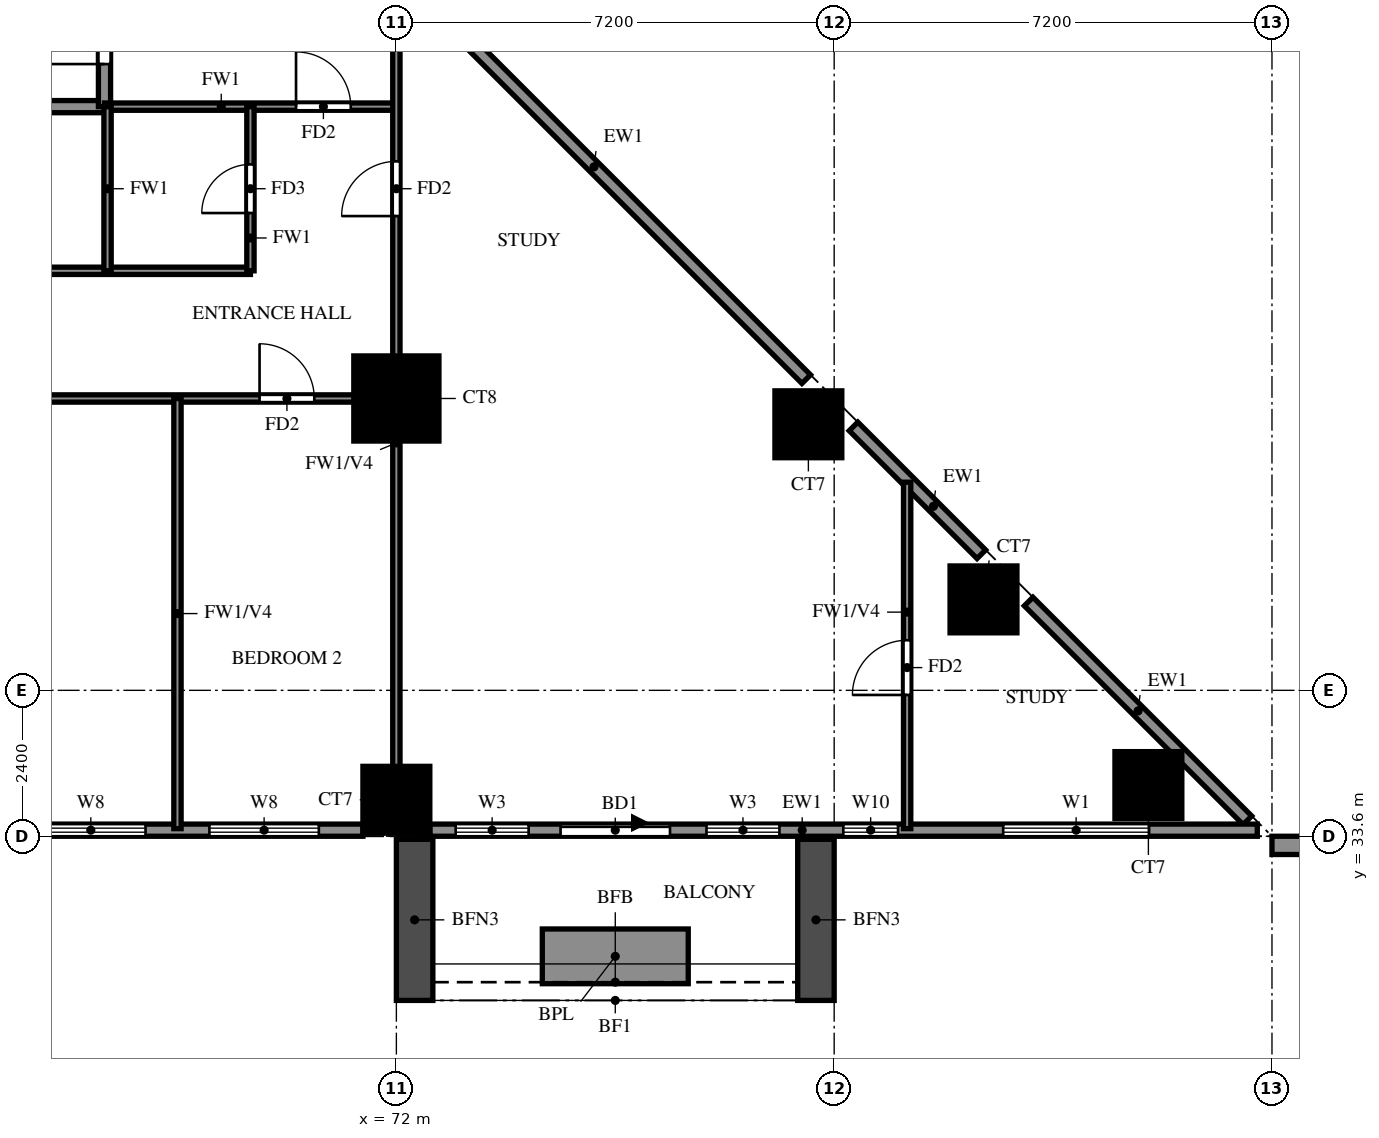
"""IFC4 building model, lengths in metres.
Left out: names, types, materials, properties, quantities, classifications, styles, units other than length and angle.
Written with IfcOpenShell. Run it as: python <this file> out.ifc"""

import sys

from ifc_helpers import new_model, si_unit, direction, frame, frame_2d, origin, origin_2d, place, context, subcontext, project, spatial, rectangle, extrude, source, transform, mapped, element, fill, save


model = new_model("IFC4")
c1 = context("Model", 3, precision=1e-05, world=origin(), true_north=direction((0.0, 1.0)))
c2 = subcontext(c1, "Body", "Model", "MODEL_VIEW")
j1 = project(units=[si_unit("LENGTHUNIT", "METRE"), si_unit("PLANEANGLEUNIT", "RADIAN")], contexts=[c1])
p1 = place(None, origin())
s1 = spatial("IfcSite", under=j1, at=p1, CompositionType="ELEMENT")
p2 = place(p1, origin())
s2 = spatial("IfcBuilding", under=s1, at=p2, CompositionType="ELEMENT")
p3 = place(p2, frame((0.0, 0.0, 34.0)))
s3 = spatial("IfcBuildingStorey", under=s2, at=p3, CompositionType="ELEMENT", Elevation=34.0)
m1 = source(origin(), c2, "Body", "SweptSolid", [
    extrude(rectangle(XDim=1.1, YDim=1.1, at=origin_2d()), origin(), (0.0, 0.0, 1.0), 3.18),
])
for number, where, z_axis, x_axis in (
    (1, (72.0, 34.2, 0.0), (0.0, 0.0, 1.0), (1.0, 0.0, 0.0)),
    (2, (84.367, 34.442, 0.0), (0.0, 0.0, 1.0), (1.0, 0.0, 0.0)),
    (3, (81.656, 37.496, 0.0), (0.0, 0.0, 1.0), (1.0, 0.0, 0.0)),
    (4, (78.776, 40.376, 0.0), (0.0, 0.0, 1.0), (1.0, 0.0, 0.0)),
):
    element("IfcColumn", number, at=place(p3, frame(where, z_axis=z_axis, x_axis=x_axis)), inside=s3, PredefinedType="COLUMN", context=c2, shape_type="MappedRepresentation", body=[
        mapped(m1, transform((0.0, 0.0, 0.0))),
    ])
m2 = source(origin(), c2, "Body", "SweptSolid", [
    extrude(rectangle(XDim=1.4, YDim=1.4, at=origin_2d()), origin(), (0.0, 0.0, 1.0), 3.18),
])
p4 = place(p3, frame((72.0, 40.8, 0.0), z_axis=(0.0, 0.0, 1.0), x_axis=(1.0, 0.0, 0.0)))
e5 = element("IfcColumn", 5, at=p4, inside=s3, PredefinedType="COLUMN", context=c2, shape_type="MappedRepresentation", body=[
    mapped(m2, transform((0.0, 0.0, 0.0))),
])
p5 = place(p3, frame((85.996, 33.863, 0.0), z_axis=(0.0, 0.0, 1.0), x_axis=(-0.7070827891, 0.707130772459, 0.0)))
e6 = element("IfcWall", 6, at=p5, inside=s3, PredefinedType="SOLIDWALL", context=c2, shape_type="SweptSolid", body=[
    extrude(rectangle(XDim=5.088, YDim=0.2, at=frame_2d((2.544, 0.0))), origin(), (0.0, 0.0, 1.0), 3.18),
])
p6 = place(p3, frame((81.62, 38.238, 0.0), z_axis=(0.0, 0.0, 1.0), x_axis=(-0.707106781187, 0.707106781187, 0.0)))
e7 = element("IfcWall", 7, at=p6, inside=s3, PredefinedType="SOLIDWALL", context=c2, shape_type="SweptSolid", body=[
    extrude(rectangle(XDim=2.973, YDim=0.2, at=frame_2d((1.486, 0.0))), origin(), (0.0, 0.0, 1.0), 3.18),
])
p7 = place(p3, frame((78.74, 41.118, 0.0), z_axis=(0.0, 0.0, 1.0), x_axis=(-0.707106781187, 0.707106781187, 0.0)))
e8 = element("IfcWall", 8, at=p7, inside=s3, PredefinedType="SOLIDWALL", context=c2, shape_type="SweptSolid", body=[
    extrude(rectangle(XDim=9.874, YDim=0.2, at=frame_2d((4.937, 0.0))), origin(), (0.0, 0.0, 1.0), 3.18),
])
p8 = place(p3, frame((65.35, 33.7, 0.0), z_axis=(0.0, 0.0, 1.0), x_axis=(1.0, 0.0, 0.0)))
e9 = element("IfcWall", 9, at=p8, inside=s3, PredefinedType="SOLIDWALL", context=c2, shape_type="SweptSolid", body=[
    extrude(rectangle(XDim=6.1, YDim=0.2, at=frame_2d((3.05, 0.0))), origin(), (0.0, 0.0, 1.0), 3.18),
])
p9 = place(p8, frame((3.575, 0.0, 0.6)))
e10 = element("IfcOpeningElement", 10, at=p9, cuts=e9, PredefinedType="OPENING", context=c2, shape_type="SweptSolid", body=[
    extrude(rectangle(XDim=1.8, YDim=2.4, at=frame_2d((0.9, 1.2))), frame((0.0, 0.11, 0.0), z_axis=(0.0, -1.0, 0.0), x_axis=(1.0, 0.0, 0.0)), (0.0, 0.0, 1.0), 0.22),
])
p10 = place(p8, frame((0.725, 0.0, 0.6)))
e11 = element("IfcOpeningElement", 11, at=p10, cuts=e9, PredefinedType="OPENING", context=c2, shape_type="SweptSolid", body=[
    extrude(rectangle(XDim=1.8, YDim=2.4, at=frame_2d((0.9, 1.2))), frame((0.0, 0.11, 0.0), z_axis=(0.0, -1.0, 0.0), x_axis=(1.0, 0.0, 0.0)), (0.0, 0.0, 1.0), 0.22),
])
p11 = place(p3, frame((72.55, 33.7, 0.0), z_axis=(0.0, 0.0, 1.0), x_axis=(1.0, 0.0, 0.0)))
e12 = element("IfcWall", 12, at=p11, inside=s3, PredefinedType="SOLIDWALL", context=c2, shape_type="SweptSolid", body=[
    extrude(rectangle(XDim=13.609, YDim=0.2, at=frame_2d((6.804, 0.0))), origin(), (0.0, 0.0, 1.0), 3.18),
])
p12 = place(p11, frame((2.15, 0.0, 0.0)))
e13 = element("IfcOpeningElement", 13, at=p12, cuts=e12, PredefinedType="OPENING", context=c2, shape_type="SweptSolid", body=[
    extrude(rectangle(XDim=1.8, YDim=2.4, at=frame_2d((0.9, 1.2))), frame((0.0, 0.11, 0.0), z_axis=(0.0, -1.0, 0.0), x_axis=(1.0, 0.0, 0.0)), (0.0, 0.0, 1.0), 0.22),
])
p13 = place(p11, frame((0.425, 0.0, 0.6)))
e14 = element("IfcOpeningElement", 14, at=p13, cuts=e12, PredefinedType="OPENING", context=c2, shape_type="SweptSolid", body=[
    extrude(rectangle(XDim=1.2, YDim=2.4, at=frame_2d((0.6, 1.2))), frame((0.0, 0.11, 0.0), z_axis=(0.0, -1.0, 0.0), x_axis=(1.0, 0.0, 0.0)), (0.0, 0.0, 1.0), 0.22),
])
p14 = place(p11, frame((4.55, 0.0, 0.6)))
e15 = element("IfcOpeningElement", 15, at=p14, cuts=e12, PredefinedType="OPENING", context=c2, shape_type="SweptSolid", body=[
    extrude(rectangle(XDim=1.2, YDim=2.4, at=frame_2d((0.6, 1.2))), frame((0.0, 0.11, 0.0), z_axis=(0.0, -1.0, 0.0), x_axis=(1.0, 0.0, 0.0)), (0.0, 0.0, 1.0), 0.22),
])
p15 = place(p11, frame((6.8, 0.0, 0.6)))
e16 = element("IfcOpeningElement", 16, at=p15, cuts=e12, PredefinedType="OPENING", context=c2, shape_type="SweptSolid", body=[
    extrude(rectangle(XDim=0.9, YDim=2.4, at=frame_2d((0.45, 1.2))), frame((0.0, 0.11, 0.0), z_axis=(0.0, -1.0, 0.0), x_axis=(1.0, 0.0, 0.0)), (0.0, 0.0, 1.0), 0.22),
])
p16 = place(p11, frame((9.429, 0.0, 0.6)))
e17 = element("IfcOpeningElement", 17, at=p16, cuts=e12, PredefinedType="OPENING", context=c2, shape_type="SweptSolid", body=[
    extrude(rectangle(XDim=2.4, YDim=2.4, at=frame_2d((1.2, 1.2))), frame((0.0, 0.11, 0.0), z_axis=(0.0, -1.0, 0.0), x_axis=(1.0, 0.0, 0.0)), (0.0, 0.0, 1.0), 0.22),
])
p17 = place(p3, frame((86.4, 33.45, -0.32), z_axis=(0.0, 0.0, 1.0), x_axis=(1.0, 0.0, 0.0)))
e18 = element("IfcWall", 18, at=p17, inside=s3, PredefinedType="SOLIDWALL", context=c2, shape_type="SweptSolid", body=[
    extrude(rectangle(XDim=2.4, YDim=0.3, at=frame_2d((1.2, 0.0))), origin(), (0.0, 0.0, 1.0), 3.5),
])
for number, where, z_axis, x_axis in (
    (19, (72.3, 33.55, 0.0), (0.0, 0.0, 1.0), (0.0, -1.0, 0.0)),
    (20, (78.9, 33.55, 0.0), (0.0, 0.0, 1.0), (0.0, -1.0, 0.0)),
):
    element("IfcWall", number, at=place(p3, frame(where, z_axis=z_axis, x_axis=x_axis)), inside=s3, PredefinedType="SOLIDWALL", context=c2, shape_type="SweptSolid", body=[
        extrude(rectangle(XDim=2.65, YDim=0.6, at=frame_2d((1.325, 0.0))), origin(), (0.0, 0.0, 1.0), 2.85),
    ])
p18 = place(p3, frame((74.4, 31.625, 0.0), z_axis=(0.0, 0.0, 1.0), x_axis=(1.0, 0.0, 0.0)))
e21 = element("IfcWall", 21, at=p18, inside=s3, PredefinedType="SOLIDWALL", context=c2, shape_type="SweptSolid", body=[
    extrude(rectangle(XDim=2.4, YDim=0.9, at=frame_2d((1.2, 0.0))), origin(), (0.0, 0.0, 1.0), 0.9),
])
p19 = place(p3, frame((60.0, 45.6, 0.0), z_axis=(0.0, 0.0, 1.0), x_axis=(1.0, 0.0, 0.0)))
e22 = element("IfcWall", 22, at=p19, inside=s3, PredefinedType="SOLIDWALL", context=c2, shape_type="SweptSolid", body=[
    extrude(rectangle(XDim=7.25, YDim=0.2, at=frame_2d((3.625, 0.0))), origin(), (0.0, 0.0, 1.0), 3.18),
])
p20 = place(p3, frame((67.2, 45.6, 0.0), z_axis=(0.0, 0.0, 1.0), x_axis=(0.0, 1.0, 0.0)))
e23 = element("IfcWall", 23, at=p20, inside=s3, PredefinedType="SOLIDWALL", context=c2, shape_type="SweptSolid", body=[
    extrude(rectangle(XDim=8.4, YDim=0.2, at=frame_2d((4.2, 0.0))), origin(), (0.0, 0.0, 1.0), 3.18),
])
p21 = place(p20, frame((0.7, 0.0, 0.0)))
e24 = element("IfcOpeningElement", 24, at=p21, cuts=e23, PredefinedType="OPENING", context=c2, shape_type="SweptSolid", body=[
    extrude(rectangle(XDim=1.0, YDim=2.1, at=frame_2d((0.5, 1.05))), frame((0.0, 0.11, 0.0), z_axis=(0.0, -1.0, 0.0), x_axis=(1.0, 0.0, 0.0)), (0.0, 0.0, 1.0), 0.22),
])
p22 = place(p3, frame((60.0, 40.8, 0.0), z_axis=(0.0, 0.0, 1.0), x_axis=(1.0, 0.0, 0.0)))
e25 = element("IfcWall", 25, at=p22, inside=s3, PredefinedType="PARTITIONING", context=c2, shape_type="SweptSolid", body=[
    extrude(rectangle(XDim=12.0, YDim=0.12, at=frame_2d((6.0, 0.0))), origin(), (0.0, 0.0, 1.0), 3.18),
])
p23 = place(p22, frame((9.75, 0.0, 0.0)))
e26 = element("IfcOpeningElement", 26, at=p23, cuts=e25, PredefinedType="OPENING", context=c2, shape_type="SweptSolid", body=[
    extrude(rectangle(XDim=0.9, YDim=2.1, at=frame_2d((0.45, 1.05))), frame((0.0, 0.07, 0.0), z_axis=(0.0, -1.0, 0.0), x_axis=(1.0, 0.0, 0.0)), (0.0, 0.0, 1.0), 0.14),
])
p24 = place(p22, frame((2.55, 0.0, 0.0)))
e27 = element("IfcOpeningElement", 27, at=p24, cuts=e25, PredefinedType="OPENING", context=c2, shape_type="SweptSolid", body=[
    extrude(rectangle(XDim=1.5, YDim=2.1, at=frame_2d((0.75, 1.05))), frame((0.0, 0.07, 0.0), z_axis=(0.0, -1.0, 0.0), x_axis=(1.0, 0.0, 0.0)), (0.0, 0.0, 1.0), 0.14),
])
p25 = place(p3, frame((60.0, 42.9, 0.0), z_axis=(0.0, 0.0, 1.0), x_axis=(1.0, 0.0, 0.0)))
e28 = element("IfcWall", 28, at=p25, inside=s3, PredefinedType="PARTITIONING", context=c2, shape_type="SweptSolid", body=[
    extrude(rectangle(XDim=9.6, YDim=0.12, at=frame_2d((4.8, 0.0))), origin(), (0.0, 0.0, 1.0), 3.18),
])
p26 = place(p25, frame((4.4, 0.0, 0.0)))
e29 = element("IfcOpeningElement", 29, at=p26, cuts=e28, PredefinedType="OPENING", context=c2, shape_type="SweptSolid", body=[
    extrude(rectangle(XDim=0.9, YDim=2.1, at=frame_2d((0.45, 1.05))), frame((0.0, 0.07, 0.0), z_axis=(0.0, -1.0, 0.0), x_axis=(1.0, 0.0, 0.0)), (0.0, 0.0, 1.0), 0.14),
])
p27 = place(p25, frame((0.825, 0.0, 0.0)))
e30 = element("IfcOpeningElement", 30, at=p27, cuts=e28, PredefinedType="OPENING", context=c2, shape_type="SweptSolid", body=[
    extrude(rectangle(XDim=0.8, YDim=2.1, at=frame_2d((0.4, 1.05))), frame((0.0, 0.07, 0.0), z_axis=(0.0, -1.0, 0.0), x_axis=(1.0, 0.0, 0.0)), (0.0, 0.0, 1.0), 0.14),
])
p28 = place(p3, frame((67.2, 45.6, 0.0), z_axis=(0.0, 0.0, 1.0), x_axis=(1.0, 0.0, 0.0)))
e31 = element("IfcWall", 31, at=p28, inside=s3, PredefinedType="PARTITIONING", context=c2, shape_type="SweptSolid", body=[
    extrude(rectangle(XDim=4.8, YDim=0.12, at=frame_2d((2.4, 0.0))), origin(), (0.0, 0.0, 1.0), 3.18),
])
p29 = place(p28, frame((3.15, 0.0, 0.0)))
e32 = element("IfcOpeningElement", 32, at=p29, cuts=e31, PredefinedType="OPENING", context=c2, shape_type="SweptSolid", body=[
    extrude(rectangle(XDim=0.9, YDim=2.1, at=frame_2d((0.45, 1.05))), frame((0.0, 0.07, 0.0), z_axis=(0.0, -1.0, 0.0), x_axis=(1.0, 0.0, 0.0)), (0.0, 0.0, 1.0), 0.14),
])
p30 = place(p3, frame((67.25, 42.9, 0.0), z_axis=(0.0, 0.0, 1.0), x_axis=(0.0, 1.0, 0.0)))
e33 = element("IfcWall", 33, at=p30, inside=s3, PredefinedType="PARTITIONING", context=c2, shape_type="SweptSolid", body=[
    extrude(rectangle(XDim=2.7, YDim=0.12, at=frame_2d((1.35, 0.0))), origin(), (0.0, 0.0, 1.0), 3.18),
])
p31 = place(p3, frame((68.4, 33.725, 0.0), z_axis=(0.0, 0.0, 1.0), x_axis=(0.0, 1.0, 0.0)))
e34 = element("IfcWall", 34, at=p31, inside=s3, PredefinedType="PARTITIONING", context=c2, shape_type="SweptSolid", body=[
    extrude(rectangle(XDim=7.075, YDim=0.12, at=frame_2d((3.538, 0.0))), origin(), (0.0, 0.0, 1.0), 2.28),
])
p32 = place(p3, frame((69.6, 42.9, 0.0), z_axis=(0.0, 0.0, 1.0), x_axis=(0.0, 1.0, 0.0)))
e35 = element("IfcWall", 35, at=p32, inside=s3, PredefinedType="PARTITIONING", context=c2, shape_type="SweptSolid", body=[
    extrude(rectangle(XDim=2.7, YDim=0.12, at=frame_2d((1.35, 0.0))), origin(), (0.0, 0.0, 1.0), 3.18),
])
p33 = place(p32, frame((0.95, 0.0, 0.0)))
e36 = element("IfcOpeningElement", 36, at=p33, cuts=e35, PredefinedType="OPENING", context=c2, shape_type="SweptSolid", body=[
    extrude(rectangle(XDim=0.8, YDim=2.1, at=frame_2d((0.4, 1.05))), frame((0.0, 0.07, 0.0), z_axis=(0.0, -1.0, 0.0), x_axis=(1.0, 0.0, 0.0)), (0.0, 0.0, 1.0), 0.14),
])
p34 = place(p3, frame((72.0, 33.725, 0.0), z_axis=(0.0, 0.0, 1.0), x_axis=(0.0, 1.0, 0.0)))
e37 = element("IfcWall", 37, at=p34, inside=s3, PredefinedType="PARTITIONING", context=c2, shape_type="SweptSolid", body=[
    extrude(rectangle(XDim=14.098, YDim=0.12, at=frame_2d((7.049, 0.0))), origin(), (0.0, 0.0, 1.0), 2.28),
])
p35 = place(p34, frame((10.075, 0.0, 0.0)))
e38 = element("IfcOpeningElement", 38, at=p35, cuts=e37, PredefinedType="OPENING", context=c2, shape_type="SweptSolid", body=[
    extrude(rectangle(XDim=0.9, YDim=2.1, at=frame_2d((0.45, 1.05))), frame((0.0, 0.07, 0.0), z_axis=(0.0, -1.0, 0.0), x_axis=(1.0, 0.0, 0.0)), (0.0, 0.0, 1.0), 0.14),
])
p36 = place(p3, frame((80.4, 33.725, 0.0), z_axis=(0.0, 0.0, 1.0), x_axis=(0.0, 1.0, 0.0)))
e39 = element("IfcWall", 39, at=p36, inside=s3, PredefinedType="PARTITIONING", context=c2, shape_type="SweptSolid", body=[
    extrude(rectangle(XDim=5.698, YDim=0.12, at=frame_2d((2.849, 0.0))), origin(), (0.0, 0.0, 1.0), 2.28),
])
p37 = place(p36, frame((2.199, 0.0, 0.0)))
e40 = element("IfcOpeningElement", 40, at=p37, cuts=e39, PredefinedType="OPENING", context=c2, shape_type="SweptSolid", body=[
    extrude(rectangle(XDim=0.9, YDim=2.1, at=frame_2d((0.45, 1.05))), frame((0.0, 0.07, 0.0), z_axis=(0.0, -1.0, 0.0), x_axis=(1.0, 0.0, 0.0)), (0.0, 0.0, 1.0), 0.14),
])
p38 = place(p9, origin())
e41 = element("IfcWindow", 41, at=p38, inside=s3, PartitioningType="DOUBLE_PANEL_VERTICAL", PredefinedType="WINDOW", context=c2, shape_type="SweptSolid", body=[
    extrude(rectangle(XDim=1.8, YDim=2.4, at=frame_2d((0.9, 1.2))), frame((0.0, 0.03, 0.0), z_axis=(0.0, -1.0, 0.0), x_axis=(1.0, 0.0, 0.0)), (0.0, 0.0, 1.0), 0.06),
])
fill(e10, e41)
p39 = place(p10, origin())
e42 = element("IfcWindow", 42, at=p39, inside=s3, PartitioningType="DOUBLE_PANEL_VERTICAL", PredefinedType="WINDOW", context=c2, shape_type="SweptSolid", body=[
    extrude(rectangle(XDim=1.8, YDim=2.4, at=frame_2d((0.9, 1.2))), frame((0.0, 0.03, 0.0), z_axis=(0.0, -1.0, 0.0), x_axis=(1.0, 0.0, 0.0)), (0.0, 0.0, 1.0), 0.06),
])
fill(e11, e42)
p40 = place(p12, origin())
e43 = element("IfcDoor", 43, at=p40, inside=s3, OperationType="DOUBLE_DOOR_SLIDING", PredefinedType="DOOR", context=c2, shape_type="SweptSolid", body=[
    extrude(rectangle(XDim=1.8, YDim=2.4, at=frame_2d((0.9, 1.2))), frame((0.0, 0.025, 0.0), z_axis=(0.0, -1.0, 0.0), x_axis=(1.0, 0.0, 0.0)), (0.0, 0.0, 1.0), 0.05),
])
fill(e13, e43)
p41 = place(p13, origin())
e44 = element("IfcWindow", 44, at=p41, inside=s3, PartitioningType="SINGLE_PANEL", PredefinedType="WINDOW", context=c2, shape_type="SweptSolid", body=[
    extrude(rectangle(XDim=1.2, YDim=2.4, at=frame_2d((0.6, 1.2))), frame((0.0, 0.03, 0.0), z_axis=(0.0, -1.0, 0.0), x_axis=(1.0, 0.0, 0.0)), (0.0, 0.0, 1.0), 0.06),
])
fill(e14, e44)
p42 = place(p14, origin())
e45 = element("IfcWindow", 45, at=p42, inside=s3, PartitioningType="SINGLE_PANEL", PredefinedType="WINDOW", context=c2, shape_type="SweptSolid", body=[
    extrude(rectangle(XDim=1.2, YDim=2.4, at=frame_2d((0.6, 1.2))), frame((0.0, 0.03, 0.0), z_axis=(0.0, -1.0, 0.0), x_axis=(1.0, 0.0, 0.0)), (0.0, 0.0, 1.0), 0.06),
])
fill(e15, e45)
p43 = place(p15, origin())
e46 = element("IfcWindow", 46, at=p43, inside=s3, PartitioningType="SINGLE_PANEL", PredefinedType="WINDOW", context=c2, shape_type="SweptSolid", body=[
    extrude(rectangle(XDim=0.9, YDim=2.4, at=frame_2d((0.45, 1.2))), frame((0.0, 0.03, 0.0), z_axis=(0.0, -1.0, 0.0), x_axis=(1.0, 0.0, 0.0)), (0.0, 0.0, 1.0), 0.06),
])
fill(e16, e46)
p44 = place(p16, origin())
e47 = element("IfcWindow", 47, at=p44, inside=s3, PartitioningType="DOUBLE_PANEL_VERTICAL", PredefinedType="WINDOW", context=c2, shape_type="SweptSolid", body=[
    extrude(rectangle(XDim=2.4, YDim=2.4, at=frame_2d((1.2, 1.2))), frame((0.0, 0.03, 0.0), z_axis=(0.0, -1.0, 0.0), x_axis=(1.0, 0.0, 0.0)), (0.0, 0.0, 1.0), 0.06),
])
fill(e17, e47)
p45 = place(p29, origin())
e48 = element("IfcDoor", 48, at=p45, inside=s3, OperationType="SINGLE_SWING_LEFT", PredefinedType="DOOR", context=c2, shape_type="SweptSolid", body=[
    extrude(rectangle(XDim=0.9, YDim=2.1, at=frame_2d((0.45, 1.05))), frame((0.0, 0.025, 0.0), z_axis=(0.0, -1.0, 0.0), x_axis=(1.0, 0.0, 0.0)), (0.0, 0.0, 1.0), 0.05),
])
fill(e32, e48)
p46 = place(p21, origin())
e49 = element("IfcDoor", 49, at=p46, inside=s3, OperationType="SINGLE_SWING_RIGHT", PredefinedType="DOOR", context=c2, shape_type="SweptSolid", body=[
    extrude(rectangle(XDim=1.0, YDim=2.1, at=frame_2d((0.5, 1.05))), frame((0.0, 0.025, 0.0), z_axis=(0.0, -1.0, 0.0), x_axis=(1.0, 0.0, 0.0)), (0.0, 0.0, 1.0), 0.05),
])
fill(e24, e49)
p47 = place(p23, origin())
e50 = element("IfcDoor", 50, at=p47, inside=s3, OperationType="SINGLE_SWING_LEFT", PredefinedType="DOOR", context=c2, shape_type="SweptSolid", body=[
    extrude(rectangle(XDim=0.9, YDim=2.1, at=frame_2d((0.45, 1.05))), frame((0.0, 0.025, 0.0), z_axis=(0.0, -1.0, 0.0), x_axis=(1.0, 0.0, 0.0)), (0.0, 0.0, 1.0), 0.05),
])
fill(e26, e50)
p48 = place(p33, origin())
e51 = element("IfcDoor", 51, at=p48, inside=s3, OperationType="SINGLE_SWING_RIGHT", PredefinedType="DOOR", context=c2, shape_type="SweptSolid", body=[
    extrude(rectangle(XDim=0.8, YDim=2.1, at=frame_2d((0.4, 1.05))), frame((0.0, 0.025, 0.0), z_axis=(0.0, -1.0, 0.0), x_axis=(1.0, 0.0, 0.0)), (0.0, 0.0, 1.0), 0.05),
])
fill(e36, e51)
p49 = place(p35, origin())
e52 = element("IfcDoor", 52, at=p49, inside=s3, OperationType="SINGLE_SWING_RIGHT", PredefinedType="DOOR", context=c2, shape_type="SweptSolid", body=[
    extrude(rectangle(XDim=0.9, YDim=2.1, at=frame_2d((0.45, 1.05))), frame((0.0, 0.025, 0.0), z_axis=(0.0, -1.0, 0.0), x_axis=(1.0, 0.0, 0.0)), (0.0, 0.0, 1.0), 0.05),
])
fill(e38, e52)
p50 = place(p37, origin())
e53 = element("IfcDoor", 53, at=p50, inside=s3, OperationType="SINGLE_SWING_RIGHT", PredefinedType="DOOR", context=c2, shape_type="SweptSolid", body=[
    extrude(rectangle(XDim=0.9, YDim=2.1, at=frame_2d((0.45, 1.05))), frame((0.0, 0.025, 0.0), z_axis=(0.0, -1.0, 0.0), x_axis=(1.0, 0.0, 0.0)), (0.0, 0.0, 1.0), 0.05),
])
fill(e40, e53)
save(model, sys.argv[1])
